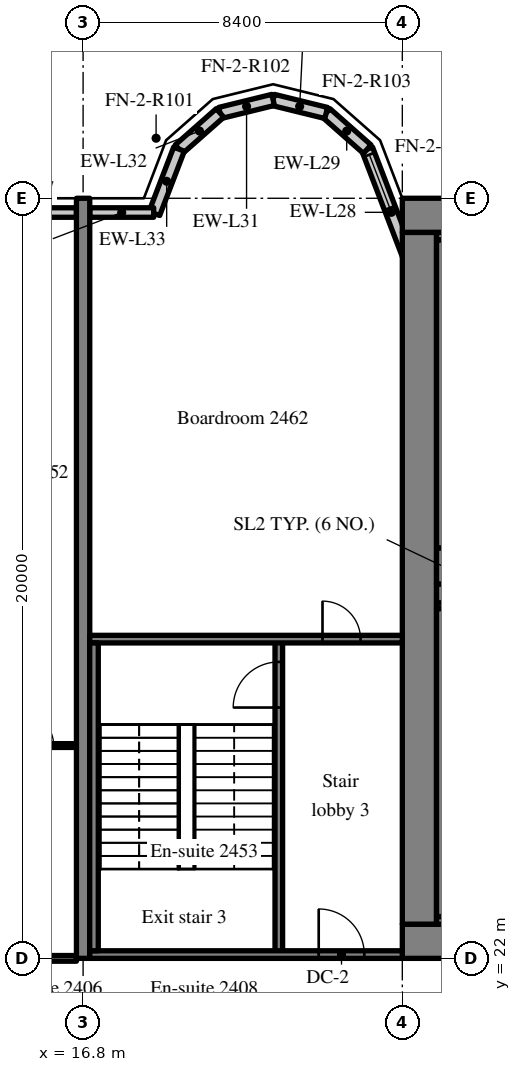
"""IFC4 building model, lengths in metres.
Left out: names, types, materials, properties, quantities, classifications, styles, units other than length and angle.
Written with IfcOpenShell. Run it as: python <this file> out.ifc"""

import sys

from ifc_helpers import new_model, si_unit, direction, frame, frame_2d, origin, place, context, subcontext, project, spatial, rectangle, extrude, source, transform, mapped, element, fill, save


model = new_model("IFC4")
c1 = context("Model", 3, precision=1e-05, world=origin(), true_north=direction((0.0, 1.0)))
c2 = subcontext(c1, "Body", "Model", "MODEL_VIEW")
j1 = project(units=[si_unit("LENGTHUNIT", "METRE"), si_unit("PLANEANGLEUNIT", "RADIAN")], contexts=[c1])
p1 = place(None, origin())
s1 = spatial("IfcSite", under=j1, at=p1, CompositionType="ELEMENT")
p2 = place(p1, origin())
s2 = spatial("IfcBuilding", under=s1, at=p2, CompositionType="ELEMENT")
p3 = place(p2, frame((0.0, 0.0, 102.8)))
s3 = spatial("IfcBuildingStorey", under=s2, at=p3, CompositionType="ELEMENT", Elevation=102.8)
m1 = source(origin(), c2, "Body", "SweptSolid", [
    extrude(rectangle(XDim=50.4, YDim=0.9, at=frame_2d((25.2, 0.0))), origin(), (0.0, 0.0, 1.0), 3.52),
])
p4 = place(p3, frame((25.2, 22.45, 0.0), z_axis=(0.0, 0.0, 1.0), x_axis=(1.0, 0.0, 0.0)))
e1 = element("IfcWall", 1, at=p4, inside=s3, PredefinedType="SHEAR", context=c2, shape_type="MappedRepresentation", body=[
    mapped(m1, transform((0.0, 0.0, 0.0), scale=1.0)),
])
m2 = source(origin(), c2, "Body", "SweptSolid", [
    extrude(rectangle(XDim=1.8, YDim=2.1, at=frame_2d((0.9, 1.05))), frame((0.0, 0.46, 0.0), z_axis=(0.0, -1.0, 0.0), x_axis=(1.0, 0.0, 0.0)), (0.0, 0.0, 1.0), 0.92),
])
p5 = place(p4, frame((15.9, 0.0, 0.0)))
e2 = element("IfcOpeningElement", 2, at=p5, cuts=e1, PredefinedType="OPENING", context=c2, shape_type="MappedRepresentation", body=[
    mapped(m2, transform((0.0, 0.0, 0.0), scale=1.0)),
])
m3 = source(origin(), c2, "Body", "SweptSolid", [
    extrude(rectangle(XDim=1.2, YDim=2.1, at=frame_2d((0.6, 1.05))), frame((0.0, 0.46, 0.0), z_axis=(0.0, -1.0, 0.0), x_axis=(1.0, 0.0, 0.0)), (0.0, 0.0, 1.0), 0.92),
])
p6 = place(p4, frame((26.975, 0.0, 0.0)))
e3 = element("IfcOpeningElement", 3, at=p6, cuts=e1, PredefinedType="OPENING", context=c2, shape_type="MappedRepresentation", body=[
    mapped(m3, transform((0.0, 0.0, 0.0), scale=1.0)),
])
m4 = source(origin(), c2, "Body", "SweptSolid", [
    extrude(rectangle(XDim=0.9, YDim=2.1, at=frame_2d((0.45, 1.05))), frame((0.0, 0.46, 0.0), z_axis=(0.0, -1.0, 0.0), x_axis=(1.0, 0.0, 0.0)), (0.0, 0.0, 1.0), 0.92),
])
p7 = place(p4, frame((32.25, 0.0, 0.0)))
e4 = element("IfcOpeningElement", 4, at=p7, cuts=e1, PredefinedType="OPENING", context=c2, shape_type="MappedRepresentation", body=[
    mapped(m4, transform((0.0, 0.0, 0.0), scale=1.0)),
])
p8 = place(p4, frame((38.275, 0.0, 0.0)))
e5 = element("IfcOpeningElement", 5, at=p8, cuts=e1, PredefinedType="OPENING", context=c2, shape_type="MappedRepresentation", body=[
    mapped(m4, transform((0.0, 0.0, 0.0), scale=1.0)),
])
p9 = place(p4, frame((6.45, 0.0, 0.0)))
e6 = element("IfcOpeningElement", 6, at=p9, cuts=e1, PredefinedType="OPENING", context=c2, shape_type="MappedRepresentation", body=[
    mapped(m3, transform((0.0, 0.0, 0.0), scale=1.0)),
])
p10 = place(p4, frame((47.775, 0.0, 0.0)))
e7 = element("IfcOpeningElement", 7, at=p10, cuts=e1, PredefinedType="OPENING", context=c2, shape_type="MappedRepresentation", body=[
    mapped(m3, transform((0.0, 0.0, 0.0), scale=1.0)),
])
p11 = place(p3, frame((25.2, 41.55, 0.0), z_axis=(0.0, 0.0, 1.0), x_axis=(1.0, 0.0, 0.0)))
e8 = element("IfcWall", 8, at=p11, inside=s3, PredefinedType="SHEAR", context=c2, shape_type="MappedRepresentation", body=[
    mapped(m1, transform((0.0, 0.0, 0.0), scale=1.0)),
])
m5 = source(origin(), c2, "Body", "SweptSolid", [
    extrude(rectangle(XDim=18.2, YDim=0.9, at=frame_2d((9.1, 0.0))), origin(), (0.0, 0.0, 1.0), 3.52),
])
p12 = place(p3, frame((25.65, 22.9, 0.0), z_axis=(0.0, 0.0, 1.0), x_axis=(0.0, 1.0, 0.0)))
e9 = element("IfcWall", 9, at=p12, inside=s3, PredefinedType="SHEAR", context=c2, shape_type="MappedRepresentation", body=[
    mapped(m5, transform((0.0, 0.0, 0.0), scale=1.0)),
])
m6 = source(origin(), c2, "Body", "SweptSolid", [
    extrude(rectangle(XDim=7.25, YDim=0.5, at=frame_2d((3.625, 0.0))), origin(), (0.0, 0.0, 1.0), 3.52),
])
p13 = place(p3, frame((26.1, 31.6, 0.0), z_axis=(0.0, 0.0, 1.0), x_axis=(1.0, 0.0, 0.0)))
e10 = element("IfcWall", 10, at=p13, inside=s3, PredefinedType="SHEAR", context=c2, shape_type="MappedRepresentation", body=[
    mapped(m6, transform((0.0, 0.0, 0.0), scale=1.0)),
])
m7 = source(origin(), c2, "Body", "SweptSolid", [
    extrude(rectangle(XDim=1.1, YDim=2.1, at=frame_2d((0.55, 1.05))), frame((0.0, 0.26, 0.0), z_axis=(0.0, -1.0, 0.0), x_axis=(1.0, 0.0, 0.0)), (0.0, 0.0, 1.0), 0.52),
])
p14 = place(p13, frame((5.6, 0.0, 0.0)))
e11 = element("IfcOpeningElement", 11, at=p14, cuts=e10, PredefinedType="OPENING", context=c2, shape_type="MappedRepresentation", body=[
    mapped(m7, transform((0.0, 0.0, 0.0), scale=1.0)),
])
m8 = source(origin(), c2, "Body", "SweptSolid", [
    extrude(rectangle(XDim=20.0, YDim=0.35, at=frame_2d((10.0, 0.0))), origin(), (0.0, 0.0, 1.0), 3.52),
])
p15 = place(p3, frame((16.8, 22.0, 0.0), z_axis=(0.0, 0.0, 1.0), x_axis=(0.0, 1.0, 0.0)))
e12 = element("IfcWall", 12, at=p15, inside=s3, PredefinedType="SHEAR", context=c2, shape_type="MappedRepresentation", body=[
    mapped(m8, transform((0.0, 0.0, 0.0), scale=1.0)),
])
m9 = source(origin(), c2, "Body", "SweptSolid", [
    extrude(rectangle(XDim=3.559, YDim=0.3, at=frame_2d((1.78, 0.0))), origin(), (0.0, 0.0, 1.0), 3.52),
])
p16 = place(p3, frame((25.55, 39.969, 0.0), z_axis=(0.0, 0.0, 1.0), x_axis=(-0.35779745313, 0.933799219604, 0.0)))
e13 = element("IfcWall", 13, at=p16, inside=s3, PredefinedType="SOLIDWALL", context=c2, shape_type="MappedRepresentation", body=[
    mapped(m9, transform((0.0, 0.0, 0.0), scale=1.0)),
])
m10 = source(origin(), c2, "Body", "SweptSolid", [
    extrude(rectangle(XDim=1.5, YDim=2.0, at=frame_2d((0.75, 1.0))), frame((0.0, 0.16, 0.0), z_axis=(0.0, -1.0, 0.0), x_axis=(1.0, 0.0, 0.0)), (0.0, 0.0, 1.0), 0.32),
])
p17 = place(p16, frame((1.903, 0.0, 0.9)))
e14 = element("IfcOpeningElement", 14, at=p17, cuts=e13, PredefinedType="OPENING", context=c2, shape_type="MappedRepresentation", body=[
    mapped(m10, transform((0.0, 0.0, 0.0), scale=1.0)),
])
m11 = source(origin(), c2, "Body", "SweptSolid", [
    extrude(rectangle(XDim=1.44, YDim=0.3, at=frame_2d((0.72, 0.0))), origin(), (0.0, 0.0, 1.0), 3.52),
])
p18 = place(p3, frame((24.277, 43.292, 0.0), z_axis=(0.0, 0.0, 1.0), x_axis=(-0.749649827867, 0.661834673902, 0.0)))
e15 = element("IfcWall", 15, at=p18, inside=s3, PredefinedType="SOLIDWALL", context=c2, shape_type="MappedRepresentation", body=[
    mapped(m11, transform((0.0, 0.0, 0.0), scale=1.0)),
])
m12 = source(origin(), c2, "Body", "SweptSolid", [
    extrude(rectangle(XDim=1.438, YDim=0.3, at=frame_2d((0.719, 0.0))), origin(), (0.0, 0.0, 1.0), 3.52),
])
p19 = place(p3, frame((23.197, 44.245, 0.0), z_axis=(0.0, 0.0, 1.0), x_axis=(-0.971152283879, 0.238460146601, 0.0)))
e16 = element("IfcWall", 16, at=p19, inside=s3, PredefinedType="SOLIDWALL", context=c2, shape_type="MappedRepresentation", body=[
    mapped(m12, transform((0.0, 0.0, 0.0), scale=1.0)),
])
m13 = source(origin(), c2, "Body", "SweptSolid", [
    extrude(rectangle(XDim=1.439, YDim=0.3, at=frame_2d((0.719, 0.0))), origin(), (0.0, 0.0, 1.0), 3.52),
])
p20 = place(p3, frame((21.8, 44.588, 0.0), z_axis=(0.0, 0.0, 1.0), x_axis=(-0.971161932466, -0.238420848351, 0.0)))
e17 = element("IfcWall", 17, at=p20, inside=s3, PredefinedType="SOLIDWALL", context=c2, shape_type="MappedRepresentation", body=[
    mapped(m13, transform((0.0, 0.0, 0.0), scale=1.0)),
])
m14 = source(origin(), c2, "Body", "SweptSolid", [
    extrude(rectangle(XDim=1.44, YDim=0.3, at=frame_2d((0.72, 0.0))), origin(), (0.0, 0.0, 1.0), 3.52),
])
p21 = place(p3, frame((20.403, 44.245, 0.0), z_axis=(0.0, 0.0, 1.0), x_axis=(-0.74957555648, -0.661918790432, 0.0)))
e18 = element("IfcWall", 18, at=p21, inside=s3, PredefinedType="SOLIDWALL", context=c2, shape_type="MappedRepresentation", body=[
    mapped(m14, transform((0.0, 0.0, 0.0), scale=1.0)),
])
m15 = source(origin(), c2, "Body", "SweptSolid", [
    extrude(rectangle(XDim=1.812, YDim=0.3, at=frame_2d((0.906, 0.0))), origin(), (0.0, 0.0, 1.0), 3.52),
])
p22 = place(p3, frame((19.323, 43.292, 0.0), z_axis=(0.0, 0.0, 1.0), x_axis=(-0.357877270961, -0.93376863244, 0.0)))
e19 = element("IfcWall", 19, at=p22, inside=s3, PredefinedType="SOLIDWALL", context=c2, shape_type="MappedRepresentation", body=[
    mapped(m15, transform((0.0, 0.0, 0.0), scale=1.0)),
])
m16 = source(origin(), c2, "Body", "SweptSolid", [
    extrude(rectangle(XDim=3.675, YDim=0.25, at=frame_2d((1.837, 0.0))), origin(), (0.0, 0.0, 1.0), 2.82),
])
p23 = place(p3, frame((16.625, 41.625, 0.0), z_axis=(0.0, 0.0, 1.0), x_axis=(-1.0, 0.0, 0.0)))
e20 = element("IfcWall", 20, at=p23, inside=s3, PredefinedType="SOLIDWALL", context=c2, shape_type="MappedRepresentation", body=[
    mapped(m16, transform((0.0, 0.0, 0.0), scale=1.0)),
])
m17 = source(origin(), c2, "Body", "SweptSolid", [
    extrude(rectangle(XDim=1.5, YDim=1.5, at=frame_2d((0.75, 0.75))), frame((0.0, 0.135, 0.0), z_axis=(0.0, -1.0, 0.0), x_axis=(1.0, 0.0, 0.0)), (0.0, 0.0, 1.0), 0.27),
])
p24 = place(p23, frame((1.087, 0.0, 0.9)))
e21 = element("IfcOpeningElement", 21, at=p24, cuts=e20, PredefinedType="OPENING", context=c2, shape_type="MappedRepresentation", body=[
    mapped(m17, transform((0.0, 0.0, 0.0), scale=1.0)),
])
m18 = source(origin(), c2, "Body", "SweptSolid", [
    extrude(rectangle(XDim=1.683, YDim=0.25, at=frame_2d((0.841, 0.0))), origin(), (0.0, 0.0, 1.0), 2.82),
])
p25 = place(p3, frame((18.658, 41.625, 0.0), z_axis=(0.0, 0.0, 1.0), x_axis=(-1.0, 0.0, 0.0)))
e22 = element("IfcWall", 22, at=p25, inside=s3, PredefinedType="SOLIDWALL", context=c2, shape_type="MappedRepresentation", body=[
    mapped(m18, transform((0.0, 0.0, 0.0), scale=1.0)),
])
m19 = source(origin(), c2, "Body", "SweptSolid", [
    extrude(rectangle(XDim=8.3, YDim=0.2, at=frame_2d((4.15, 0.0))), origin(), (0.0, 0.0, 1.0), 3.52),
])
p26 = place(p3, frame((21.95, 22.1, 0.0), z_axis=(0.0, 0.0, 1.0), x_axis=(0.0, 1.0, 0.0)))
e23 = element("IfcWall", 23, at=p26, inside=s3, PredefinedType="SOLIDWALL", context=c2, shape_type="MappedRepresentation", body=[
    mapped(m19, transform((0.0, 0.0, 0.0), scale=1.0)),
])
m20 = source(origin(), c2, "Body", "SweptSolid", [
    extrude(rectangle(XDim=1.2, YDim=2.1, at=frame_2d((0.6, 1.05))), frame((0.0, 0.11, 0.0), z_axis=(0.0, -1.0, 0.0), x_axis=(1.0, 0.0, 0.0)), (0.0, 0.0, 1.0), 0.22),
])
p27 = place(p26, frame((6.5, 0.0, 0.0)))
e24 = element("IfcOpeningElement", 24, at=p27, cuts=e23, PredefinedType="OPENING", context=c2, shape_type="MappedRepresentation", body=[
    mapped(m20, transform((0.0, 0.0, 0.0), scale=1.0)),
])
m21 = source(origin(), c2, "Body", "SweptSolid", [
    extrude(rectangle(XDim=8.225, YDim=0.2, at=frame_2d((4.112, 0.0))), origin(), (0.0, 0.0, 1.0), 3.52),
])
p28 = place(p3, frame((16.975, 22.1, 0.0), z_axis=(0.0, 0.0, 1.0), x_axis=(1.0, 0.0, 0.0)))
e25 = element("IfcWall", 25, at=p28, inside=s3, PredefinedType="SOLIDWALL", context=c2, shape_type="MappedRepresentation", body=[
    mapped(m21, transform((0.0, 0.0, 0.0), scale=1.0)),
])
p29 = place(p28, frame((6.025, 0.0, 0.0)))
e26 = element("IfcOpeningElement", 26, at=p29, cuts=e25, PredefinedType="OPENING", context=c2, shape_type="MappedRepresentation", body=[
    mapped(m20, transform((0.0, 0.0, 0.0), scale=1.0)),
])
p30 = place(p3, frame((16.975, 30.4, 0.0), z_axis=(0.0, 0.0, 1.0), x_axis=(1.0, 0.0, 0.0)))
e27 = element("IfcWall", 27, at=p30, inside=s3, PredefinedType="SOLIDWALL", context=c2, shape_type="MappedRepresentation", body=[
    mapped(m21, transform((0.0, 0.0, 0.0), scale=1.0)),
])
m22 = source(origin(), c2, "Body", "SweptSolid", [
    extrude(rectangle(XDim=1.0, YDim=2.1, at=frame_2d((0.5, 1.05))), frame((0.0, 0.11, 0.0), z_axis=(0.0, -1.0, 0.0), x_axis=(1.0, 0.0, 0.0)), (0.0, 0.0, 1.0), 0.22),
])
p31 = place(p30, frame((6.125, 0.0, 0.0)))
e28 = element("IfcOpeningElement", 28, at=p31, cuts=e27, PredefinedType="OPENING", context=c2, shape_type="MappedRepresentation", body=[
    mapped(m22, transform((0.0, 0.0, 0.0), scale=1.0)),
])
m23 = source(origin(), c2, "Body", "SweptSolid", [
    extrude(rectangle(XDim=4.85, YDim=0.2, at=frame_2d((2.425, 0.0))), origin(), (0.0, 0.0, 1.0), 3.52),
])
p32 = place(p3, frame((26.1, 23.0, 0.0), z_axis=(0.0, 0.0, 1.0), x_axis=(1.0, 0.0, 0.0)))
e29 = element("IfcWall", 29, at=p32, inside=s3, PredefinedType="SOLIDWALL", context=c2, shape_type="MappedRepresentation", body=[
    mapped(m23, transform((0.0, 0.0, 0.0), scale=1.0)),
])
m24 = source(origin(), c2, "Body", "SweptSolid", [
    extrude(rectangle(XDim=4.85, YDim=0.15, at=frame_2d((2.425, 0.0))), origin(), (0.0, 0.0, 1.0), 3.52),
])
p33 = place(p3, frame((26.1, 31.275, 0.0), z_axis=(0.0, 0.0, 1.0), x_axis=(1.0, 0.0, 0.0)))
e30 = element("IfcWall", 30, at=p33, inside=s3, PredefinedType="SOLIDWALL", context=c2, shape_type="MappedRepresentation", body=[
    mapped(m24, transform((0.0, 0.0, 0.0), scale=1.0)),
])
m25 = source(origin(), c2, "Body", "SweptSolid", [
    extrude(rectangle(XDim=8.1, YDim=0.2, at=frame_2d((4.05, 0.0))), origin(), (0.0, 0.0, 1.0), 3.52),
])
p34 = place(p3, frame((26.2, 23.1, 0.0), z_axis=(0.0, 0.0, 1.0), x_axis=(0.0, 1.0, 0.0)))
e31 = element("IfcWall", 31, at=p34, inside=s3, PredefinedType="SOLIDWALL", context=c2, shape_type="MappedRepresentation", body=[
    mapped(m25, transform((0.0, 0.0, 0.0), scale=1.0)),
])
m26 = source(origin(), c2, "Body", "SweptSolid", [
    extrude(rectangle(XDim=8.1, YDim=0.225, at=frame_2d((4.05, 0.0))), origin(), (0.0, 0.0, 1.0), 3.52),
])
p35 = place(p3, frame((17.087, 22.2, 0.0), z_axis=(0.0, 0.0, 1.0), x_axis=(0.0, 1.0, 0.0)))
e32 = element("IfcWall", 32, at=p35, inside=s3, PredefinedType="SOLIDWALL", context=c2, shape_type="MappedRepresentation", body=[
    mapped(m26, transform((0.0, 0.0, 0.0), scale=1.0)),
])
p36 = place(p3, frame((26.1, 41.0, 0.0), z_axis=(0.0, 0.0, 1.0), x_axis=(1.0, 0.0, 0.0)))
e33 = element("IfcWall", 33, at=p36, inside=s3, PredefinedType="SOLIDWALL", context=c2, shape_type="MappedRepresentation", body=[
    mapped(m23, transform((0.0, 0.0, 0.0), scale=1.0)),
])
m27 = source(origin(), c2, "Body", "SweptSolid", [
    extrude(rectangle(XDim=4.85, YDim=0.95, at=frame_2d((2.425, 0.0))), origin(), (0.0, 0.0, 1.0), 3.52),
])
p37 = place(p3, frame((26.1, 32.325, 0.0), z_axis=(0.0, 0.0, 1.0), x_axis=(1.0, 0.0, 0.0)))
e34 = element("IfcWall", 34, at=p37, inside=s3, PredefinedType="SOLIDWALL", context=c2, shape_type="MappedRepresentation", body=[
    mapped(m27, transform((0.0, 0.0, 0.0), scale=1.0)),
])
p38 = place(p3, frame((26.2, 32.8, 0.0), z_axis=(0.0, 0.0, 1.0), x_axis=(0.0, 1.0, 0.0)))
e35 = element("IfcWall", 35, at=p38, inside=s3, PredefinedType="SOLIDWALL", context=c2, shape_type="MappedRepresentation", body=[
    mapped(m25, transform((0.0, 0.0, 0.0), scale=1.0)),
])
m28 = source(origin(), c2, "Body", "SweptSolid", [
    extrude(rectangle(XDim=2.1, YDim=0.1, at=frame_2d((1.05, 0.0))), origin(), (0.0, 0.0, 1.0), 3.52),
])
p39 = place(p3, frame((14.525, 27.6, 0.0), z_axis=(0.0, 0.0, 1.0), x_axis=(1.0, 0.0, 0.0)))
e36 = element("IfcWall", 36, at=p39, inside=s3, PredefinedType="PARTITIONING", context=c2, shape_type="MappedRepresentation", body=[
    mapped(m28, transform((0.0, 0.0, 0.0), scale=1.0)),
])
m29 = source(origin(), c2, "Body", "SweptSolid", [
    extrude(rectangle(XDim=0.9, YDim=2.1, at=frame_2d((0.45, 1.05))), frame((0.0, 0.06, 0.0), z_axis=(0.0, -1.0, 0.0), x_axis=(1.0, 0.0, 0.0)), (0.0, 0.0, 1.0), 0.12),
])
p40 = place(p39, frame((0.6, 0.0, 0.0)))
e37 = element("IfcOpeningElement", 37, at=p40, cuts=e36, PredefinedType="OPENING", context=c2, shape_type="MappedRepresentation", body=[
    mapped(m29, transform((0.0, 0.0, 0.0), scale=1.0)),
])
m30 = source(origin(), c2, "Body", "SweptSolid", [
    extrude(rectangle(XDim=3.95, YDim=0.15, at=frame_2d((1.975, 0.0))), origin(), (0.0, 0.0, 1.0), 2.82),
])
p41 = place(p3, frame((12.675, 22.0, 0.0), z_axis=(0.0, 0.0, 1.0), x_axis=(1.0, 0.0, 0.0)))
e38 = element("IfcWall", 38, at=p41, inside=s3, PredefinedType="PARTITIONING", context=c2, shape_type="MappedRepresentation", body=[
    mapped(m30, transform((0.0, 0.0, 0.0), scale=1.0)),
])
m31 = source(origin(), c2, "Body", "SweptSolid", [
    extrude(rectangle(XDim=1.0, YDim=2.1, at=frame_2d((0.5, 1.05))), frame((0.0, 0.085, 0.0), z_axis=(0.0, -1.0, 0.0), x_axis=(1.0, 0.0, 0.0)), (0.0, 0.0, 1.0), 0.17),
])
p42 = place(p41, frame((0.4, 0.0, 0.0)))
e39 = element("IfcOpeningElement", 39, at=p42, cuts=e38, PredefinedType="OPENING", context=c2, shape_type="MappedRepresentation", body=[
    mapped(m31, transform((0.0, 0.0, 0.0), scale=1.0)),
])
m32 = source(origin(), c2, "Body", "SweptSolid", [
    extrude(rectangle(XDim=1.5, YDim=2.0, at=frame_2d((0.75, 1.0))), frame((0.0, 0.03, 0.0), z_axis=(0.0, -1.0, 0.0), x_axis=(1.0, 0.0, 0.0)), (0.0, 0.0, 1.0), 0.06),
])
p43 = place(p17, origin())
e40 = element("IfcWindow", 40, at=p43, inside=s3, PartitioningType="SINGLE_PANEL", PredefinedType="WINDOW", context=c2, shape_type="MappedRepresentation", body=[
    mapped(m32, transform((0.0, 0.0, 0.0), scale=1.0)),
])
fill(e14, e40)
m33 = source(origin(), c2, "Body", "SweptSolid", [
    extrude(rectangle(XDim=1.2, YDim=2.1, at=frame_2d((0.6, 1.05))), frame((0.0, 0.025, 0.0), z_axis=(0.0, -1.0, 0.0), x_axis=(1.0, 0.0, 0.0)), (0.0, 0.0, 1.0), 0.05),
])
p44 = place(p27, origin())
e41 = element("IfcDoor", 41, at=p44, inside=s3, OperationType="SINGLE_SWING_LEFT", PredefinedType="DOOR", context=c2, shape_type="MappedRepresentation", body=[
    mapped(m33, transform((0.0, 0.0, 0.0), scale=1.0)),
])
fill(e24, e41)
p45 = place(p29, origin())
e42 = element("IfcDoor", 42, at=p45, inside=s3, OperationType="SINGLE_SWING_LEFT", PredefinedType="DOOR", context=c2, shape_type="MappedRepresentation", body=[
    mapped(m33, transform((0.0, 0.0, 0.0), scale=1.0)),
])
fill(e26, e42)
m34 = source(origin(), c2, "Body", "SweptSolid", [
    extrude(rectangle(XDim=1.0, YDim=2.1, at=frame_2d((0.5, 1.05))), frame((0.0, 0.025, 0.0), z_axis=(0.0, -1.0, 0.0), x_axis=(1.0, 0.0, 0.0)), (0.0, 0.0, 1.0), 0.05),
])
p46 = place(p31, origin())
e43 = element("IfcDoor", 43, at=p46, inside=s3, OperationType="SINGLE_SWING_LEFT", PredefinedType="DOOR", context=c2, shape_type="MappedRepresentation", body=[
    mapped(m34, transform((0.0, 0.0, 0.0), scale=1.0)),
])
fill(e28, e43)
m35 = source(origin(), c2, "Body", "SweptSolid", [
    extrude(rectangle(XDim=0.9, YDim=2.1, at=frame_2d((0.45, 1.05))), frame((0.0, 0.025, 0.0), z_axis=(0.0, -1.0, 0.0), x_axis=(1.0, 0.0, 0.0)), (0.0, 0.0, 1.0), 0.05),
])
p47 = place(p40, origin())
e44 = element("IfcDoor", 44, at=p47, inside=s3, OperationType="SINGLE_SWING_LEFT", PredefinedType="DOOR", context=c2, shape_type="MappedRepresentation", body=[
    mapped(m35, transform((0.0, 0.0, 0.0), scale=1.0)),
])
fill(e37, e44)
save(model, sys.argv[1])
